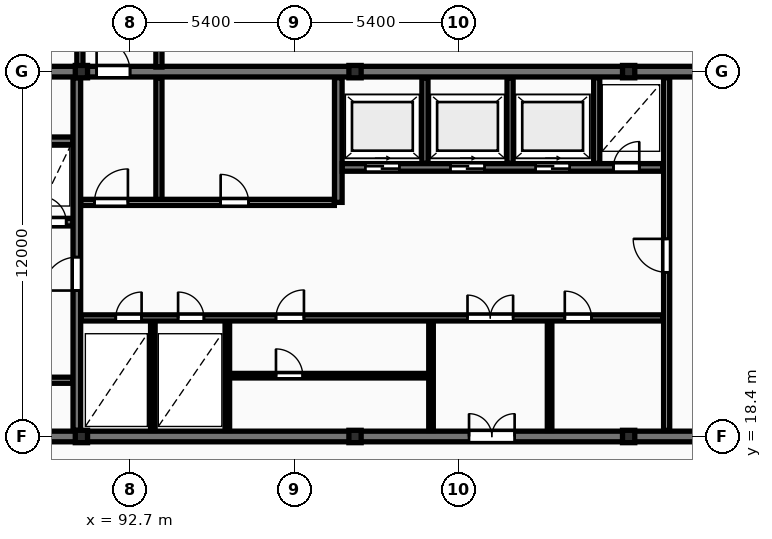
"""IFC4 building model, lengths in metres.
Left out: names, types, materials, properties, quantities, classifications, styles, units other than length and angle.
Written with IfcOpenShell. Run it as: python <this file> out.ifc"""

import sys

from ifc_helpers import new_model, si_unit, direction, frame, frame_2d, origin, origin_2d, place, context, subcontext, project, spatial, rectangle, i_section, extrude, element, fill, save


model = new_model("IFC4")
c1 = context("Model", 3, precision=1e-05, world=origin(), true_north=direction((0.0, 1.0)))
c2 = subcontext(c1, "Body", "Model", "MODEL_VIEW")
j1 = project(units=[si_unit("LENGTHUNIT", "METRE"), si_unit("PLANEANGLEUNIT", "RADIAN")], contexts=[c1])
p1 = place(None, origin())
s1 = spatial("IfcSite", under=j1, at=p1, CompositionType="ELEMENT")
p2 = place(p1, origin())
s2 = spatial("IfcBuilding", under=s1, at=p2, CompositionType="ELEMENT")
p3 = place(p2, frame((0.0, 0.0, 150.1)))
s3 = spatial("IfcBuildingStorey", under=s2, at=p3, CompositionType="ELEMENT", Elevation=150.1)
for number, where, z_axis, x_axis in (
    (1, (91.1, 18.4, 0.0), (0.0, 0.0, 1.0), (1.0, 0.0, 0.0)),
    (2, (91.1, 30.4, 0.0), (0.0, 0.0, 1.0), (1.0, 0.0, 0.0)),
    (3, (100.1, 18.4, 0.0), (0.0, 0.0, 1.0), (1.0, 0.0, 0.0)),
    (4, (100.1, 30.4, 0.0), (0.0, 0.0, 1.0), (1.0, 0.0, 0.0)),
    (5, (109.1, 18.4, 0.0), (0.0, 0.0, 1.0), (1.0, 0.0, 0.0)),
    (6, (109.1, 30.4, 0.0), (0.0, 0.0, 1.0), (1.0, 0.0, 0.0)),
):
    element("IfcColumn", number, at=place(p3, frame(where, z_axis=z_axis, x_axis=x_axis)), inside=s3, PredefinedType="COLUMN", context=c2, shape_type="SweptSolid", body=[
        extrude(i_section(OverallWidth=0.403, OverallDepth=0.406, WebThickness=0.027, FlangeThickness=0.043, FilletRadius=0.015, at=origin_2d()), origin(), (0.0, 0.0, 1.0), 3.6),
    ])
p4 = place(p3, frame((81.925, 30.4, 0.0), z_axis=(0.0, 0.0, 1.0), x_axis=(1.0, 0.0, 0.0)))
e7 = element("IfcWall", 7, at=p4, inside=s3, PredefinedType="SHEAR", context=c2, shape_type="SweptSolid", body=[
    extrude(rectangle(XDim=36.265, YDim=0.35, at=frame_2d((18.132, 0.0))), origin(), (0.0, 0.0, 1.0), 3.6),
])
p5 = place(p4, frame((9.675, 0.0, 0.0)))
e8 = element("IfcOpeningElement", 8, at=p5, cuts=e7, PredefinedType="OPENING", context=c2, shape_type="SweptSolid", body=[
    extrude(rectangle(XDim=1.1, YDim=2.1, at=frame_2d((0.55, 1.05))), frame((0.0, 0.185, 0.0), z_axis=(0.0, -1.0, 0.0), x_axis=(1.0, 0.0, 0.0)), (0.0, 0.0, 1.0), 0.37),
])
p6 = place(p3, frame((81.925, 18.4, 0.0), z_axis=(0.0, 0.0, 1.0), x_axis=(1.0, 0.0, 0.0)))
e9 = element("IfcWall", 9, at=p6, inside=s3, PredefinedType="SHEAR", context=c2, shape_type="SweptSolid", body=[
    extrude(rectangle(XDim=36.265, YDim=0.35, at=frame_2d((18.132, 0.0))), origin(), (0.0, 0.0, 1.0), 3.6),
])
p7 = place(p6, frame((5.675, 0.0, 0.0)))
e10 = element("IfcOpeningElement", 10, at=p7, cuts=e9, PredefinedType="OPENING", context=c2, shape_type="SweptSolid", body=[
    extrude(rectangle(XDim=1.0, YDim=2.15, at=frame_2d((0.5, 1.075))), frame((0.0, 0.185, 0.0), z_axis=(0.0, -1.0, 0.0), x_axis=(1.0, 0.0, 0.0)), (0.0, 0.0, 1.0), 0.37),
])
p8 = place(p6, frame((21.925, 0.0, 0.0)))
e11 = element("IfcOpeningElement", 11, at=p8, cuts=e9, PredefinedType="OPENING", context=c2, shape_type="SweptSolid", body=[
    extrude(rectangle(XDim=1.5, YDim=2.2, at=frame_2d((0.75, 1.1))), frame((0.0, 0.185, 0.0), z_axis=(0.0, -1.0, 0.0), x_axis=(1.0, 0.0, 0.0)), (0.0, 0.0, 1.0), 0.37),
])
p9 = place(p6, frame((29.875, 0.0, 0.0)))
e12 = element("IfcOpeningElement", 12, at=p9, cuts=e9, PredefinedType="OPENING", context=c2, shape_type="SweptSolid", body=[
    extrude(rectangle(XDim=1.0, YDim=2.15, at=frame_2d((0.5, 1.075))), frame((0.0, 0.185, 0.0), z_axis=(0.0, -1.0, 0.0), x_axis=(1.0, 0.0, 0.0)), (0.0, 0.0, 1.0), 0.37),
])
p10 = place(p3, frame((83.0, 28.125, 0.0), z_axis=(0.0, 0.0, 1.0), x_axis=(1.0, 0.0, 0.0)))
e13 = element("IfcWall", 13, at=p10, inside=s3, PredefinedType="SHEAR", context=c2, shape_type="SweptSolid", body=[
    extrude(rectangle(XDim=7.82, YDim=0.25, at=frame_2d((3.91, 0.0))), origin(), (0.0, 0.0, 1.0), 3.6),
])
p11 = place(p3, frame((86.5, 25.45, 0.0), z_axis=(0.0, 0.0, 1.0), x_axis=(1.0, 0.0, 0.0)))
e14 = element("IfcWall", 14, at=p11, inside=s3, PredefinedType="SHEAR", context=c2, shape_type="SweptSolid", body=[
    extrude(rectangle(XDim=4.32, YDim=0.25, at=frame_2d((2.16, 0.0))), origin(), (0.0, 0.0, 1.0), 3.6),
])
p12 = place(p11, frame((1.14, 0.0, 0.0)))
e15 = element("IfcOpeningElement", 15, at=p12, cuts=e14, PredefinedType="OPENING", context=c2, shape_type="SweptSolid", body=[
    extrude(rectangle(XDim=1.12, YDim=2.12, at=frame_2d((0.56, 1.06))), frame((0.0, 0.135, 0.0), z_axis=(0.0, -1.0, 0.0), x_axis=(1.0, 0.0, 0.0)), (0.0, 0.0, 1.0), 0.27),
])
p13 = place(p11, frame((3.25, 0.0, 0.0)))
e16 = element("IfcOpeningElement", 16, at=p13, cuts=e14, PredefinedType="OPENING", context=c2, shape_type="SweptSolid", body=[
    extrude(rectangle(XDim=0.85, YDim=2.05, at=frame_2d((0.425, 1.025))), frame((0.0, 0.135, 0.0), z_axis=(0.0, -1.0, 0.0), x_axis=(1.0, 0.0, 0.0)), (0.0, 0.0, 1.0), 0.27),
])
p14 = place(p3, frame((86.5, 20.25, 0.0), z_axis=(0.0, 0.0, 1.0), x_axis=(1.0, 0.0, 0.0)))
e17 = element("IfcWall", 17, at=p14, inside=s3, PredefinedType="PARTITIONING", context=c2, shape_type="SweptSolid", body=[
    extrude(rectangle(XDim=4.32, YDim=0.2, at=frame_2d((2.16, 0.0))), origin(), (0.0, 0.0, 1.0), 3.31),
])
p15 = place(p14, frame((1.4, 0.0, 0.0)))
e18 = element("IfcOpeningElement", 18, at=p15, cuts=e17, PredefinedType="OPENING", context=c2, shape_type="SweptSolid", body=[
    extrude(rectangle(XDim=1.1, YDim=2.1, at=frame_2d((0.55, 1.05))), frame((0.0, 0.11, 0.0), z_axis=(0.0, -1.0, 0.0), x_axis=(1.0, 0.0, 0.0)), (0.0, 0.0, 1.0), 0.22),
])
p16 = place(p3, frame((90.95, 18.6, 0.0), z_axis=(0.0, 0.0, 1.0), x_axis=(0.0, 1.0, 0.0)))
e19 = element("IfcWall", 19, at=p16, inside=s3, PredefinedType="SHEAR", context=c2, shape_type="SweptSolid", body=[
    extrude(rectangle(XDim=11.6, YDim=0.25, at=frame_2d((5.8, 0.0))), origin(), (0.0, 0.0, 1.0), 3.6),
])
p17 = place(p16, frame((4.6, 0.0, 0.0)))
e20 = element("IfcOpeningElement", 20, at=p17, cuts=e19, PredefinedType="OPENING", context=c2, shape_type="SweptSolid", body=[
    extrude(rectangle(XDim=1.1, YDim=2.1, at=frame_2d((0.55, 1.05))), frame((0.0, 0.135, 0.0), z_axis=(0.0, -1.0, 0.0), x_axis=(1.0, 0.0, 0.0)), (0.0, 0.0, 1.0), 0.27),
])
p18 = place(p3, frame((93.65, 26.1, 0.0), z_axis=(0.0, 0.0, 1.0), x_axis=(0.0, 1.0, 0.0)))
e21 = element("IfcWall", 21, at=p18, inside=s3, PredefinedType="PARTITIONING", context=c2, shape_type="SweptSolid", body=[
    extrude(rectangle(XDim=4.1, YDim=0.2, at=frame_2d((2.05, 0.0))), origin(), (0.0, 0.0, 1.0), 3.31),
])
p19 = place(p3, frame((91.08, 26.1, 0.0), z_axis=(0.0, 0.0, 1.0), x_axis=(1.0, 0.0, 0.0)))
e22 = element("IfcWall", 22, at=p19, inside=s3, PredefinedType="PARTITIONING", context=c2, shape_type="SweptSolid", body=[
    extrude(rectangle(XDim=8.34, YDim=0.2, at=frame_2d((4.17, 0.0))), origin(), (0.0, 0.0, 1.0), 3.31),
])
p20 = place(p19, frame((0.45, 0.0, 0.0)))
e23 = element("IfcOpeningElement", 23, at=p20, cuts=e22, PredefinedType="OPENING", context=c2, shape_type="SweptSolid", body=[
    extrude(rectangle(XDim=1.1, YDim=2.1, at=frame_2d((0.55, 1.05))), frame((0.0, 0.11, 0.0), z_axis=(0.0, -1.0, 0.0), x_axis=(1.0, 0.0, 0.0)), (0.0, 0.0, 1.0), 0.22),
])
p21 = place(p19, frame((4.6, 0.0, 0.0)))
e24 = element("IfcOpeningElement", 24, at=p21, cuts=e22, PredefinedType="OPENING", context=c2, shape_type="SweptSolid", body=[
    extrude(rectangle(XDim=0.92, YDim=2.08, at=frame_2d((0.46, 1.04))), frame((0.0, 0.11, 0.0), z_axis=(0.0, -1.0, 0.0), x_axis=(1.0, 0.0, 0.0)), (0.0, 0.0, 1.0), 0.22),
])
p22 = place(p3, frame((99.55, 26.1, 0.0), z_axis=(0.0, 0.0, 1.0), x_axis=(0.0, 1.0, 0.0)))
e25 = element("IfcWall", 25, at=p22, inside=s3, PredefinedType="SHEAR", context=c2, shape_type="SweptSolid", body=[
    extrude(rectangle(XDim=4.1, YDim=0.25, at=frame_2d((2.05, 0.0))), origin(), (0.0, 0.0, 1.0), 3.6),
])
for number, where, z_axis, x_axis in (
    (26, (102.4, 27.38, 0.0), (0.0, 0.0, 1.0), (0.0, 1.0, 0.0)),
    (27, (105.2, 27.38, 0.0), (0.0, 0.0, 1.0), (0.0, 1.0, 0.0)),
    (28, (108.05, 27.38, 0.0), (0.0, 0.0, 1.0), (0.0, 1.0, 0.0)),
):
    element("IfcWall", number, at=place(p3, frame(where, z_axis=z_axis, x_axis=x_axis)), inside=s3, PredefinedType="PARTITIONING", context=c2, shape_type="SweptSolid", body=[
        extrude(rectangle(XDim=2.82, YDim=0.2, at=frame_2d((1.41, 0.0))), origin(), (0.0, 0.0, 1.0), 3.31),
    ])
p23 = place(p3, frame((99.68, 27.25, 0.0), z_axis=(0.0, 0.0, 1.0), x_axis=(1.0, 0.0, 0.0)))
e29 = element("IfcWall", 29, at=p23, inside=s3, PredefinedType="SHEAR", context=c2, shape_type="SweptSolid", body=[
    extrude(rectangle(XDim=10.54, YDim=0.25, at=frame_2d((5.27, 0.0))), origin(), (0.0, 0.0, 1.0), 3.6),
])
p24 = place(p23, frame((0.76, 0.0, 0.0)))
e30 = element("IfcOpeningElement", 30, at=p24, cuts=e29, PredefinedType="OPENING", context=c2, shape_type="SweptSolid", body=[
    extrude(rectangle(XDim=1.12, YDim=2.12, at=frame_2d((0.56, 1.06))), frame((0.0, 0.135, 0.0), z_axis=(0.0, -1.0, 0.0), x_axis=(1.0, 0.0, 0.0)), (0.0, 0.0, 1.0), 0.27),
])
p25 = place(p23, frame((3.56, 0.0, 0.0)))
e31 = element("IfcOpeningElement", 31, at=p25, cuts=e29, PredefinedType="OPENING", context=c2, shape_type="SweptSolid", body=[
    extrude(rectangle(XDim=1.12, YDim=2.12, at=frame_2d((0.56, 1.06))), frame((0.0, 0.135, 0.0), z_axis=(0.0, -1.0, 0.0), x_axis=(1.0, 0.0, 0.0)), (0.0, 0.0, 1.0), 0.27),
])
p26 = place(p23, frame((6.36, 0.0, 0.0)))
e32 = element("IfcOpeningElement", 32, at=p26, cuts=e29, PredefinedType="OPENING", context=c2, shape_type="SweptSolid", body=[
    extrude(rectangle(XDim=1.12, YDim=2.12, at=frame_2d((0.56, 1.06))), frame((0.0, 0.135, 0.0), z_axis=(0.0, -1.0, 0.0), x_axis=(1.0, 0.0, 0.0)), (0.0, 0.0, 1.0), 0.27),
])
p27 = place(p23, frame((8.92, 0.0, 0.0)))
e33 = element("IfcOpeningElement", 33, at=p27, cuts=e29, PredefinedType="OPENING", context=c2, shape_type="SweptSolid", body=[
    extrude(rectangle(XDim=0.85, YDim=2.05, at=frame_2d((0.425, 1.025))), frame((0.0, 0.135, 0.0), z_axis=(0.0, -1.0, 0.0), x_axis=(1.0, 0.0, 0.0)), (0.0, 0.0, 1.0), 0.27),
])
for number, where, z_axis, x_axis in (
    (34, (93.45, 18.6, 0.0), (0.0, 0.0, 1.0), (0.0, 1.0, 0.0)),
    (35, (95.9, 18.6, 0.0), (0.0, 0.0, 1.0), (0.0, 1.0, 0.0)),
):
    element("IfcWall", number, at=place(p3, frame(where, z_axis=z_axis, x_axis=x_axis)), inside=s3, PredefinedType="PARTITIONING", context=c2, shape_type="SweptSolid", body=[
        extrude(rectangle(XDim=3.6, YDim=0.15, at=frame_2d((1.8, 0.0))), origin(), (0.0, 0.0, 1.0), 3.31),
    ])
p28 = place(p3, frame((95.9, 20.4, 0.0), z_axis=(0.0, 0.0, 1.0), x_axis=(1.0, 0.0, 0.0)))
e36 = element("IfcWall", 36, at=p28, inside=s3, PredefinedType="PARTITIONING", context=c2, shape_type="SweptSolid", body=[
    extrude(rectangle(XDim=6.7, YDim=0.15, at=frame_2d((3.35, 0.0))), origin(), (0.0, 0.0, 1.0), 3.31),
])
p29 = place(p28, frame((1.6, 0.0, 0.0)))
e37 = element("IfcOpeningElement", 37, at=p29, cuts=e36, PredefinedType="OPENING", context=c2, shape_type="SweptSolid", body=[
    extrude(rectangle(XDim=0.88, YDim=2.06, at=frame_2d((0.44, 1.03))), frame((0.0, 0.085, 0.0), z_axis=(0.0, -1.0, 0.0), x_axis=(1.0, 0.0, 0.0)), (0.0, 0.0, 1.0), 0.17),
])
for number, where, z_axis, x_axis in (
    (38, (102.6, 18.6, 0.0), (0.0, 0.0, 1.0), (0.0, 1.0, 0.0)),
    (39, (106.5, 18.6, 0.0), (0.0, 0.0, 1.0), (0.0, 1.0, 0.0)),
):
    element("IfcWall", number, at=place(p3, frame(where, z_axis=z_axis, x_axis=x_axis)), inside=s3, PredefinedType="PARTITIONING", context=c2, shape_type="SweptSolid", body=[
        extrude(rectangle(XDim=3.6, YDim=0.15, at=frame_2d((1.8, 0.0))), origin(), (0.0, 0.0, 1.0), 3.31),
    ])
p30 = place(p3, frame((91.08, 22.3, 0.0), z_axis=(0.0, 0.0, 1.0), x_axis=(1.0, 0.0, 0.0)))
e40 = element("IfcWall", 40, at=p30, inside=s3, PredefinedType="PARTITIONING", context=c2, shape_type="SweptSolid", body=[
    extrude(rectangle(XDim=19.14, YDim=0.2, at=frame_2d((9.57, 0.0))), origin(), (0.0, 0.0, 1.0), 3.31),
])
p31 = place(p30, frame((1.15, 0.0, 0.0)))
e41 = element("IfcOpeningElement", 41, at=p31, cuts=e40, PredefinedType="OPENING", context=c2, shape_type="SweptSolid", body=[
    extrude(rectangle(XDim=0.85, YDim=2.05, at=frame_2d((0.425, 1.025))), frame((0.0, 0.11, 0.0), z_axis=(0.0, -1.0, 0.0), x_axis=(1.0, 0.0, 0.0)), (0.0, 0.0, 1.0), 0.22),
])
p32 = place(p30, frame((3.2, 0.0, 0.0)))
e42 = element("IfcOpeningElement", 42, at=p32, cuts=e40, PredefinedType="OPENING", context=c2, shape_type="SweptSolid", body=[
    extrude(rectangle(XDim=0.85, YDim=2.05, at=frame_2d((0.425, 1.025))), frame((0.0, 0.11, 0.0), z_axis=(0.0, -1.0, 0.0), x_axis=(1.0, 0.0, 0.0)), (0.0, 0.0, 1.0), 0.22),
])
p33 = place(p30, frame((12.72, 0.0, 0.0)))
e43 = element("IfcOpeningElement", 43, at=p33, cuts=e40, PredefinedType="OPENING", context=c2, shape_type="SweptSolid", body=[
    extrude(rectangle(XDim=1.5, YDim=2.2, at=frame_2d((0.75, 1.1))), frame((0.0, 0.11, 0.0), z_axis=(0.0, -1.0, 0.0), x_axis=(1.0, 0.0, 0.0)), (0.0, 0.0, 1.0), 0.22),
])
p34 = place(p30, frame((6.42, 0.0, 0.0)))
e44 = element("IfcOpeningElement", 44, at=p34, cuts=e40, PredefinedType="OPENING", context=c2, shape_type="SweptSolid", body=[
    extrude(rectangle(XDim=0.92, YDim=2.08, at=frame_2d((0.46, 1.04))), frame((0.0, 0.11, 0.0), z_axis=(0.0, -1.0, 0.0), x_axis=(1.0, 0.0, 0.0)), (0.0, 0.0, 1.0), 0.22),
])
p35 = place(p30, frame((15.92, 0.0, 0.0)))
e45 = element("IfcOpeningElement", 45, at=p35, cuts=e40, PredefinedType="OPENING", context=c2, shape_type="SweptSolid", body=[
    extrude(rectangle(XDim=0.88, YDim=2.06, at=frame_2d((0.44, 1.03))), frame((0.0, 0.11, 0.0), z_axis=(0.0, -1.0, 0.0), x_axis=(1.0, 0.0, 0.0)), (0.0, 0.0, 1.0), 0.22),
])
p36 = place(p3, frame((110.35, 18.6, 0.0), z_axis=(0.0, 0.0, 1.0), x_axis=(0.0, 1.0, 0.0)))
e46 = element("IfcWall", 46, at=p36, inside=s3, PredefinedType="PARTITIONING", context=c2, shape_type="SweptSolid", body=[
    extrude(rectangle(XDim=11.6, YDim=0.2, at=frame_2d((5.8, 0.0))), origin(), (0.0, 0.0, 1.0), 3.31),
])
p37 = place(p36, frame((5.2, 0.0, 0.0)))
e47 = element("IfcOpeningElement", 47, at=p37, cuts=e46, PredefinedType="OPENING", context=c2, shape_type="SweptSolid", body=[
    extrude(rectangle(XDim=1.1, YDim=2.15, at=frame_2d((0.55, 1.075))), frame((0.0, 0.11, 0.0), z_axis=(0.0, -1.0, 0.0), x_axis=(1.0, 0.0, 0.0)), (0.0, 0.0, 1.0), 0.22),
])
p38 = place(p3, frame((91.05, 30.55, 0.0), z_axis=(0.0, 0.0, 1.0), x_axis=(0.0, 1.0, 0.0)))
e48 = element("IfcWall", 48, at=p38, inside=s3, PredefinedType="PARTITIONING", context=c2, shape_type="SweptSolid", body=[
    extrude(rectangle(XDim=2.2, YDim=0.2, at=frame_2d((1.1, 0.0))), origin(), (0.0, 0.0, 1.0), 3.31),
])
p39 = place(p3, frame((93.65, 30.55, 0.0), z_axis=(0.0, 0.0, 1.0), x_axis=(0.0, 1.0, 0.0)))
e49 = element("IfcWall", 49, at=p39, inside=s3, PredefinedType="PARTITIONING", context=c2, shape_type="SweptSolid", body=[
    extrude(rectangle(XDim=2.2, YDim=0.2, at=frame_2d((1.1, 0.0))), origin(), (0.0, 0.0, 1.0), 2.389),
])
p40 = place(p5, origin())
e50 = element("IfcDoor", 50, at=p40, inside=s3, OperationType="SINGLE_SWING_LEFT", PredefinedType="DOOR", context=c2, shape_type="SweptSolid", body=[
    extrude(rectangle(XDim=1.1, YDim=2.1, at=frame_2d((0.55, 1.05))), frame((0.0, 0.025, 0.0), z_axis=(0.0, -1.0, 0.0), x_axis=(1.0, 0.0, 0.0)), (0.0, 0.0, 1.0), 0.05),
])
fill(e8, e50)
p41 = place(p8, origin())
e51 = element("IfcDoor", 51, at=p41, inside=s3, OperationType="DOUBLE_DOOR_SINGLE_SWING", PredefinedType="DOOR", context=c2, shape_type="SweptSolid", body=[
    extrude(rectangle(XDim=1.5, YDim=2.2, at=frame_2d((0.75, 1.1))), frame((0.0, 0.025, 0.0), z_axis=(0.0, -1.0, 0.0), x_axis=(1.0, 0.0, 0.0)), (0.0, 0.0, 1.0), 0.05),
])
fill(e11, e51)
p42 = place(p13, origin())
e52 = element("IfcDoor", 52, at=p42, inside=s3, OperationType="SINGLE_SWING_LEFT", PredefinedType="DOOR", context=c2, shape_type="SweptSolid", body=[
    extrude(rectangle(XDim=0.85, YDim=2.05, at=frame_2d((0.425, 1.025))), frame((0.0, 0.025, 0.0), z_axis=(0.0, -1.0, 0.0), x_axis=(1.0, 0.0, 0.0)), (0.0, 0.0, 1.0), 0.05),
])
fill(e16, e52)
p43 = place(p17, origin())
e53 = element("IfcDoor", 53, at=p43, inside=s3, OperationType="SINGLE_SWING_LEFT", PredefinedType="DOOR", context=c2, shape_type="SweptSolid", body=[
    extrude(rectangle(XDim=1.1, YDim=2.1, at=frame_2d((0.55, 1.05))), frame((0.0, 0.025, 0.0), z_axis=(0.0, -1.0, 0.0), x_axis=(1.0, 0.0, 0.0)), (0.0, 0.0, 1.0), 0.05),
])
fill(e20, e53)
p44 = place(p20, origin())
e54 = element("IfcDoor", 54, at=p44, inside=s3, OperationType="SINGLE_SWING_RIGHT", PredefinedType="DOOR", context=c2, shape_type="SweptSolid", body=[
    extrude(rectangle(XDim=1.1, YDim=2.1, at=frame_2d((0.55, 1.05))), frame((0.0, 0.025, 0.0), z_axis=(0.0, -1.0, 0.0), x_axis=(1.0, 0.0, 0.0)), (0.0, 0.0, 1.0), 0.05),
])
fill(e23, e54)
p45 = place(p21, origin())
e55 = element("IfcDoor", 55, at=p45, inside=s3, OperationType="SINGLE_SWING_LEFT", PredefinedType="DOOR", context=c2, shape_type="SweptSolid", body=[
    extrude(rectangle(XDim=0.92, YDim=2.08, at=frame_2d((0.46, 1.04))), frame((0.0, 0.025, 0.0), z_axis=(0.0, -1.0, 0.0), x_axis=(1.0, 0.0, 0.0)), (0.0, 0.0, 1.0), 0.05),
])
fill(e24, e55)
p46 = place(p24, origin())
e56 = element("IfcDoor", 56, at=p46, inside=s3, OperationType="SLIDING_TO_RIGHT", PredefinedType="DOOR", context=c2, shape_type="SweptSolid", body=[
    extrude(rectangle(XDim=1.12, YDim=2.12, at=frame_2d((0.56, 1.06))), frame((0.0, 0.025, 0.0), z_axis=(0.0, -1.0, 0.0), x_axis=(1.0, 0.0, 0.0)), (0.0, 0.0, 1.0), 0.05),
])
fill(e30, e56)
p47 = place(p25, origin())
e57 = element("IfcDoor", 57, at=p47, inside=s3, OperationType="SLIDING_TO_RIGHT", PredefinedType="DOOR", context=c2, shape_type="SweptSolid", body=[
    extrude(rectangle(XDim=1.12, YDim=2.12, at=frame_2d((0.56, 1.06))), frame((0.0, 0.025, 0.0), z_axis=(0.0, -1.0, 0.0), x_axis=(1.0, 0.0, 0.0)), (0.0, 0.0, 1.0), 0.05),
])
fill(e31, e57)
p48 = place(p26, origin())
e58 = element("IfcDoor", 58, at=p48, inside=s3, OperationType="SLIDING_TO_RIGHT", PredefinedType="DOOR", context=c2, shape_type="SweptSolid", body=[
    extrude(rectangle(XDim=1.12, YDim=2.12, at=frame_2d((0.56, 1.06))), frame((0.0, 0.025, 0.0), z_axis=(0.0, -1.0, 0.0), x_axis=(1.0, 0.0, 0.0)), (0.0, 0.0, 1.0), 0.05),
])
fill(e32, e58)
p49 = place(p27, origin())
e59 = element("IfcDoor", 59, at=p49, inside=s3, OperationType="SINGLE_SWING_RIGHT", PredefinedType="DOOR", context=c2, shape_type="SweptSolid", body=[
    extrude(rectangle(XDim=0.85, YDim=2.05, at=frame_2d((0.425, 1.025))), frame((0.0, 0.025, 0.0), z_axis=(0.0, -1.0, 0.0), x_axis=(1.0, 0.0, 0.0)), (0.0, 0.0, 1.0), 0.05),
])
fill(e33, e59)
p50 = place(p29, origin())
e60 = element("IfcDoor", 60, at=p50, inside=s3, OperationType="SINGLE_SWING_LEFT", PredefinedType="DOOR", context=c2, shape_type="SweptSolid", body=[
    extrude(rectangle(XDim=0.88, YDim=2.06, at=frame_2d((0.44, 1.03))), frame((0.0, 0.025, 0.0), z_axis=(0.0, -1.0, 0.0), x_axis=(1.0, 0.0, 0.0)), (0.0, 0.0, 1.0), 0.05),
])
fill(e37, e60)
p51 = place(p31, origin())
e61 = element("IfcDoor", 61, at=p51, inside=s3, OperationType="SINGLE_SWING_RIGHT", PredefinedType="DOOR", context=c2, shape_type="SweptSolid", body=[
    extrude(rectangle(XDim=0.85, YDim=2.05, at=frame_2d((0.425, 1.025))), frame((0.0, 0.025, 0.0), z_axis=(0.0, -1.0, 0.0), x_axis=(1.0, 0.0, 0.0)), (0.0, 0.0, 1.0), 0.05),
])
fill(e41, e61)
p52 = place(p32, origin())
e62 = element("IfcDoor", 62, at=p52, inside=s3, OperationType="SINGLE_SWING_LEFT", PredefinedType="DOOR", context=c2, shape_type="SweptSolid", body=[
    extrude(rectangle(XDim=0.85, YDim=2.05, at=frame_2d((0.425, 1.025))), frame((0.0, 0.025, 0.0), z_axis=(0.0, -1.0, 0.0), x_axis=(1.0, 0.0, 0.0)), (0.0, 0.0, 1.0), 0.05),
])
fill(e42, e62)
p53 = place(p33, origin())
e63 = element("IfcDoor", 63, at=p53, inside=s3, OperationType="DOUBLE_DOOR_SINGLE_SWING", PredefinedType="DOOR", context=c2, shape_type="SweptSolid", body=[
    extrude(rectangle(XDim=1.5, YDim=2.2, at=frame_2d((0.75, 1.1))), frame((0.0, 0.025, 0.0), z_axis=(0.0, -1.0, 0.0), x_axis=(1.0, 0.0, 0.0)), (0.0, 0.0, 1.0), 0.05),
])
fill(e43, e63)
p54 = place(p34, origin())
e64 = element("IfcDoor", 64, at=p54, inside=s3, OperationType="SINGLE_SWING_RIGHT", PredefinedType="DOOR", context=c2, shape_type="SweptSolid", body=[
    extrude(rectangle(XDim=0.92, YDim=2.08, at=frame_2d((0.46, 1.04))), frame((0.0, 0.025, 0.0), z_axis=(0.0, -1.0, 0.0), x_axis=(1.0, 0.0, 0.0)), (0.0, 0.0, 1.0), 0.05),
])
fill(e44, e64)
p55 = place(p35, origin())
e65 = element("IfcDoor", 65, at=p55, inside=s3, OperationType="SINGLE_SWING_LEFT", PredefinedType="DOOR", context=c2, shape_type="SweptSolid", body=[
    extrude(rectangle(XDim=0.88, YDim=2.06, at=frame_2d((0.44, 1.03))), frame((0.0, 0.025, 0.0), z_axis=(0.0, -1.0, 0.0), x_axis=(1.0, 0.0, 0.0)), (0.0, 0.0, 1.0), 0.05),
])
fill(e45, e65)
p56 = place(p37, origin())
e66 = element("IfcDoor", 66, at=p56, inside=s3, OperationType="SINGLE_SWING_RIGHT", PredefinedType="DOOR", context=c2, shape_type="SweptSolid", body=[
    extrude(rectangle(XDim=1.1, YDim=2.15, at=frame_2d((0.55, 1.075))), frame((0.0, 0.025, 0.0), z_axis=(0.0, -1.0, 0.0), x_axis=(1.0, 0.0, 0.0)), (0.0, 0.0, 1.0), 0.05),
])
fill(e47, e66)
save(model, sys.argv[1])
